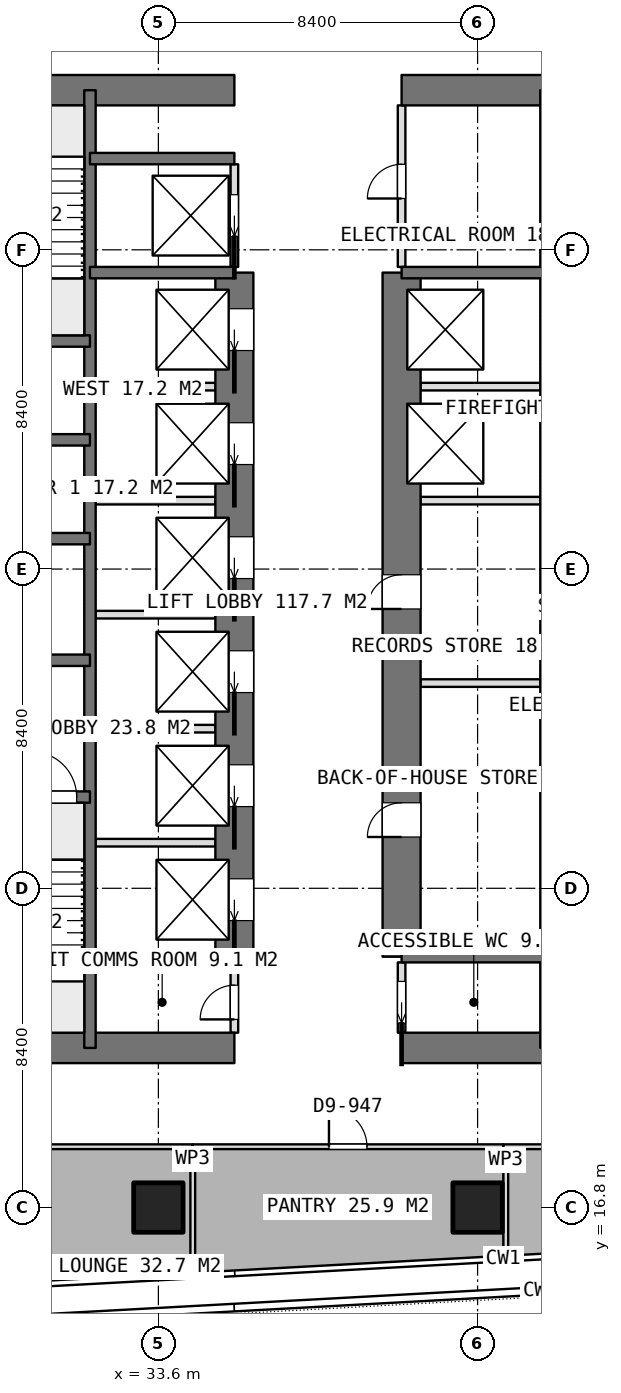
"""IFC4 building model, lengths in metres.
Left out: names, types, materials, properties, quantities, classifications, styles, units other than length and angle.
Written with IfcOpenShell. Run it as: python <this file> out.ifc"""

import sys

from ifc_helpers import new_model, si_unit, direction, frame, frame_2d, origin, origin_2d, place, context, subcontext, project, spatial, rectangle, extrude, element, fill, save


model = new_model("IFC4")
c1 = context("Model", 3, precision=1e-05, world=origin(), true_north=direction((0.0, 1.0)))
c2 = subcontext(c1, "Body", "Model", "MODEL_VIEW")
j1 = project(units=[si_unit("LENGTHUNIT", "METRE"), si_unit("PLANEANGLEUNIT", "RADIAN")], contexts=[c1])
p1 = place(None, origin())
s1 = spatial("IfcSite", under=j1, at=p1, CompositionType="ELEMENT")
p2 = place(p1, origin())
s2 = spatial("IfcBuilding", under=s1, at=p2, CompositionType="ELEMENT")
p3 = place(p2, frame((0.0, 0.0, 253.85)))
s3 = spatial("IfcBuildingStorey", under=s2, at=p3, CompositionType="ELEMENT", Elevation=253.85)
p4 = place(p3, frame((25.2, 21.0, 0.0), z_axis=(0.0, 0.0, 1.0), x_axis=(1.0, 0.0, 0.0)))
e1 = element("IfcWall", 1, at=p4, inside=s3, PredefinedType="SHEAR", context=c2, shape_type="SweptSolid", body=[
    extrude(rectangle(XDim=10.4, YDim=0.8, at=frame_2d((5.2, 0.0))), origin(), (0.0, 0.0, 1.0), 3.75),
])
p5 = place(p3, frame((40.0, 21.0, 0.0), z_axis=(0.0, 0.0, 1.0), x_axis=(1.0, 0.0, 0.0)))
e2 = element("IfcWall", 2, at=p5, inside=s3, PredefinedType="SHEAR", context=c2, shape_type="SweptSolid", body=[
    extrude(rectangle(XDim=10.4, YDim=0.8, at=frame_2d((5.2, 0.0))), origin(), (0.0, 0.0, 1.0), 3.75),
])
p6 = place(p3, frame((25.2, 46.2, 0.0), z_axis=(0.0, 0.0, 1.0), x_axis=(1.0, 0.0, 0.0)))
e3 = element("IfcWall", 3, at=p6, inside=s3, PredefinedType="SHEAR", context=c2, shape_type="SweptSolid", body=[
    extrude(rectangle(XDim=10.4, YDim=0.8, at=frame_2d((5.2, 0.0))), origin(), (0.0, 0.0, 1.0), 3.75),
])
p7 = place(p3, frame((40.0, 46.2, 0.0), z_axis=(0.0, 0.0, 1.0), x_axis=(1.0, 0.0, 0.0)))
e4 = element("IfcWall", 4, at=p7, inside=s3, PredefinedType="SHEAR", context=c2, shape_type="SweptSolid", body=[
    extrude(rectangle(XDim=10.4, YDim=0.8, at=frame_2d((5.2, 0.0))), origin(), (0.0, 0.0, 1.0), 3.75),
])
for number, where, z_axis, x_axis in (
    (5, (31.8, 21.0, 0.0), (0.0, 0.0, 1.0), (0.0, 1.0, 0.0)),
    (6, (43.8, 21.0, 0.0), (0.0, 0.0, 1.0), (0.0, 1.0, 0.0)),
):
    element("IfcWall", number, at=place(p3, frame(where, z_axis=z_axis, x_axis=x_axis)), inside=s3, PredefinedType="SHEAR", context=c2, shape_type="SweptSolid", body=[
        extrude(rectangle(XDim=25.2, YDim=0.3, at=frame_2d((12.6, 0.0))), origin(), (0.0, 0.0, 1.0), 3.75),
    ])
p8 = place(p3, frame((35.6, 23.4, 0.0), z_axis=(0.0, 0.0, 1.0), x_axis=(0.0, 1.0, 0.0)))
e7 = element("IfcWall", 7, at=p8, inside=s3, PredefinedType="SHEAR", context=c2, shape_type="SweptSolid", body=[
    extrude(rectangle(XDim=18.0, YDim=1.0, at=frame_2d((9.0, 0.0))), origin(), (0.0, 0.0, 1.0), 3.75),
])
p9 = place(p8, frame((0.95, 0.0, 0.0)))
e8 = element("IfcOpeningElement", 8, at=p9, cuts=e7, PredefinedType="OPENING", context=c2, shape_type="SweptSolid", body=[
    extrude(rectangle(XDim=1.1, YDim=2.1, at=frame_2d((0.55, 1.05))), frame((0.0, 0.51, 0.0), z_axis=(0.0, -1.0, 0.0), x_axis=(1.0, 0.0, 0.0)), (0.0, 0.0, 1.0), 1.02),
])
p10 = place(p8, frame((3.95, 0.0, 0.0)))
e9 = element("IfcOpeningElement", 9, at=p10, cuts=e7, PredefinedType="OPENING", context=c2, shape_type="SweptSolid", body=[
    extrude(rectangle(XDim=1.1, YDim=2.1, at=frame_2d((0.55, 1.05))), frame((0.0, 0.51, 0.0), z_axis=(0.0, -1.0, 0.0), x_axis=(1.0, 0.0, 0.0)), (0.0, 0.0, 1.0), 1.02),
])
p11 = place(p8, frame((6.95, 0.0, 0.0)))
e10 = element("IfcOpeningElement", 10, at=p11, cuts=e7, PredefinedType="OPENING", context=c2, shape_type="SweptSolid", body=[
    extrude(rectangle(XDim=1.1, YDim=2.1, at=frame_2d((0.55, 1.05))), frame((0.0, 0.51, 0.0), z_axis=(0.0, -1.0, 0.0), x_axis=(1.0, 0.0, 0.0)), (0.0, 0.0, 1.0), 1.02),
])
p12 = place(p8, frame((9.95, 0.0, 0.0)))
e11 = element("IfcOpeningElement", 11, at=p12, cuts=e7, PredefinedType="OPENING", context=c2, shape_type="SweptSolid", body=[
    extrude(rectangle(XDim=1.1, YDim=2.1, at=frame_2d((0.55, 1.05))), frame((0.0, 0.51, 0.0), z_axis=(0.0, -1.0, 0.0), x_axis=(1.0, 0.0, 0.0)), (0.0, 0.0, 1.0), 1.02),
])
p13 = place(p8, frame((12.95, 0.0, 0.0)))
e12 = element("IfcOpeningElement", 12, at=p13, cuts=e7, PredefinedType="OPENING", context=c2, shape_type="SweptSolid", body=[
    extrude(rectangle(XDim=1.1, YDim=2.1, at=frame_2d((0.55, 1.05))), frame((0.0, 0.51, 0.0), z_axis=(0.0, -1.0, 0.0), x_axis=(1.0, 0.0, 0.0)), (0.0, 0.0, 1.0), 1.02),
])
p14 = place(p8, frame((15.95, 0.0, 0.0)))
e13 = element("IfcOpeningElement", 13, at=p14, cuts=e7, PredefinedType="OPENING", context=c2, shape_type="SweptSolid", body=[
    extrude(rectangle(XDim=1.1, YDim=2.1, at=frame_2d((0.55, 1.05))), frame((0.0, 0.51, 0.0), z_axis=(0.0, -1.0, 0.0), x_axis=(1.0, 0.0, 0.0)), (0.0, 0.0, 1.0), 1.02),
])
p15 = place(p3, frame((40.0, 23.4, 0.0), z_axis=(0.0, 0.0, 1.0), x_axis=(0.0, 1.0, 0.0)))
e14 = element("IfcWall", 14, at=p15, inside=s3, PredefinedType="SHEAR", context=c2, shape_type="SweptSolid", body=[
    extrude(rectangle(XDim=18.0, YDim=1.0, at=frame_2d((9.0, 0.0))), origin(), (0.0, 0.0, 1.0), 3.75),
])
p16 = place(p15, frame((3.15, 0.0, 0.0)))
e15 = element("IfcOpeningElement", 15, at=p16, cuts=e14, PredefinedType="OPENING", context=c2, shape_type="SweptSolid", body=[
    extrude(rectangle(XDim=0.9, YDim=2.1, at=frame_2d((0.45, 1.05))), frame((0.0, 0.51, 0.0), z_axis=(0.0, -1.0, 0.0), x_axis=(1.0, 0.0, 0.0)), (0.0, 0.0, 1.0), 1.02),
])
p17 = place(p15, frame((9.15, 0.0, 0.0)))
e16 = element("IfcOpeningElement", 16, at=p17, cuts=e14, PredefinedType="OPENING", context=c2, shape_type="SweptSolid", body=[
    extrude(rectangle(XDim=0.9, YDim=2.1, at=frame_2d((0.45, 1.05))), frame((0.0, 0.51, 0.0), z_axis=(0.0, -1.0, 0.0), x_axis=(1.0, 0.0, 0.0)), (0.0, 0.0, 1.0), 1.02),
])
for number, where, z_axis, x_axis in (
    (17, (31.8, 23.4, 0.0), (0.0, 0.0, 1.0), (1.0, 0.0, 0.0)),
    (18, (31.8, 41.4, 0.0), (0.0, 0.0, 1.0), (1.0, 0.0, 0.0)),
    (19, (31.8, 44.4, 0.0), (0.0, 0.0, 1.0), (1.0, 0.0, 0.0)),
    (20, (40.0, 23.4, 0.0), (0.0, 0.0, 1.0), (1.0, 0.0, 0.0)),
    (21, (40.0, 41.4, 0.0), (0.0, 0.0, 1.0), (1.0, 0.0, 0.0)),
):
    element("IfcWall", number, at=place(p3, frame(where, z_axis=z_axis, x_axis=x_axis)), inside=s3, PredefinedType="SHEAR", context=c2, shape_type="SweptSolid", body=[
        extrude(rectangle(XDim=3.8, YDim=0.3, at=frame_2d((1.9, 0.0))), origin(), (0.0, 0.0, 1.0), 3.75),
    ])
p18 = place(p3, frame((25.2, 27.6, 0.0), z_axis=(0.0, 0.0, 1.0), x_axis=(1.0, 0.0, 0.0)))
e22 = element("IfcWall", 22, at=p18, inside=s3, PredefinedType="SHEAR", context=c2, shape_type="SweptSolid", body=[
    extrude(rectangle(XDim=6.6, YDim=0.3, at=frame_2d((3.3, 0.0))), origin(), (0.0, 0.0, 1.0), 3.75),
])
p19 = place(p18, frame((5.05, 0.0, 0.0)))
e23 = element("IfcOpeningElement", 23, at=p19, cuts=e22, PredefinedType="OPENING", context=c2, shape_type="SweptSolid", body=[
    extrude(rectangle(XDim=1.2, YDim=2.1, at=frame_2d((0.6, 1.05))), frame((0.0, 0.16, 0.0), z_axis=(0.0, -1.0, 0.0), x_axis=(1.0, 0.0, 0.0)), (0.0, 0.0, 1.0), 0.32),
])
p20 = place(p3, frame((25.2, 31.2, 0.0), z_axis=(0.0, 0.0, 1.0), x_axis=(1.0, 0.0, 0.0)))
e24 = element("IfcWall", 24, at=p20, inside=s3, PredefinedType="SHEAR", context=c2, shape_type="SweptSolid", body=[
    extrude(rectangle(XDim=6.6, YDim=0.3, at=frame_2d((3.3, 0.0))), origin(), (0.0, 0.0, 1.0), 3.75),
])
p21 = place(p20, frame((2.65, 0.0, 0.0)))
e25 = element("IfcOpeningElement", 25, at=p21, cuts=e24, PredefinedType="OPENING", context=c2, shape_type="SweptSolid", body=[
    extrude(rectangle(XDim=1.3, YDim=2.1, at=frame_2d((0.65, 1.05))), frame((0.0, 0.16, 0.0), z_axis=(0.0, -1.0, 0.0), x_axis=(1.0, 0.0, 0.0)), (0.0, 0.0, 1.0), 0.32),
])
for number, where, z_axis, x_axis in (
    (26, (25.2, 34.4, 0.0), (0.0, 0.0, 1.0), (1.0, 0.0, 0.0)),
    (27, (25.2, 37.0, 0.0), (0.0, 0.0, 1.0), (1.0, 0.0, 0.0)),
    (28, (25.2, 39.6, 0.0), (0.0, 0.0, 1.0), (1.0, 0.0, 0.0)),
):
    element("IfcWall", number, at=place(p3, frame(where, z_axis=z_axis, x_axis=x_axis)), inside=s3, PredefinedType="SHEAR", context=c2, shape_type="SweptSolid", body=[
        extrude(rectangle(XDim=6.6, YDim=0.3, at=frame_2d((3.3, 0.0))), origin(), (0.0, 0.0, 1.0), 3.75),
    ])
for number, where, z_axis, x_axis in (
    (29, (33.6, 16.8, 0.0), (0.0, 0.0, 1.0), (1.0, 0.0, 0.0)),
    (30, (42.0, 16.8, 0.0), (0.0, 0.0, 1.0), (1.0, 0.0, 0.0)),
):
    element("IfcColumn", number, at=place(p3, frame(where, z_axis=z_axis, x_axis=x_axis)), inside=s3, PredefinedType="COLUMN", context=c2, shape_type="SweptSolid", body=[
        extrude(rectangle(XDim=1.3, YDim=1.3, at=origin_2d()), origin(), (0.0, 0.0, 1.0), 3.75),
    ])
for number, where, z_axis, x_axis in (
    (31, (31.95, 26.4, 0.0), (0.0, 0.0, 1.0), (1.0, 0.0, 0.0)),
    (32, (31.95, 29.4, 0.0), (0.0, 0.0, 1.0), (1.0, 0.0, 0.0)),
    (33, (31.95, 32.4, 0.0), (0.0, 0.0, 1.0), (1.0, 0.0, 0.0)),
    (34, (31.95, 35.4, 0.0), (0.0, 0.0, 1.0), (1.0, 0.0, 0.0)),
    (35, (31.95, 38.4, 0.0), (0.0, 0.0, 1.0), (1.0, 0.0, 0.0)),
):
    element("IfcWall", number, at=place(p3, frame(where, z_axis=z_axis, x_axis=x_axis)), inside=s3, PredefinedType="PARTITIONING", context=c2, shape_type="SweptSolid", body=[
        extrude(rectangle(XDim=3.15, YDim=0.2, at=frame_2d((1.575, 0.0))), origin(), (0.0, 0.0, 1.0), 3.5),
    ])
for number, where, z_axis, x_axis in (
    (36, (40.5, 35.4, 0.0), (0.0, 0.0, 1.0), (1.0, 0.0, 0.0)),
    (37, (40.5, 38.4, 0.0), (0.0, 0.0, 1.0), (1.0, 0.0, 0.0)),
):
    element("IfcWall", number, at=place(p3, frame(where, z_axis=z_axis, x_axis=x_axis)), inside=s3, PredefinedType="PARTITIONING", context=c2, shape_type="SweptSolid", body=[
        extrude(rectangle(XDim=3.15, YDim=0.2, at=frame_2d((1.575, 0.0))), origin(), (0.0, 0.0, 1.0), 3.5),
    ])
p22 = place(p3, frame((40.0, 21.4, 0.0), z_axis=(0.0, 0.0, 1.0), x_axis=(0.0, 1.0, 0.0)))
e38 = element("IfcWall", 38, at=p22, inside=s3, PredefinedType="PARTITIONING", context=c2, shape_type="SweptSolid", body=[
    extrude(rectangle(XDim=1.85, YDim=0.2, at=frame_2d((0.925, 0.0))), origin(), (0.0, 0.0, 1.0), 3.5),
])
p23 = place(p22, frame((0.25, 0.0, 0.0)))
e39 = element("IfcOpeningElement", 39, at=p23, cuts=e38, PredefinedType="OPENING", context=c2, shape_type="SweptSolid", body=[
    extrude(rectangle(XDim=1.1, YDim=2.1, at=frame_2d((0.55, 1.05))), frame((0.0, 0.11, 0.0), z_axis=(0.0, -1.0, 0.0), x_axis=(1.0, 0.0, 0.0)), (0.0, 0.0, 1.0), 0.22),
])
p24 = place(p3, frame((40.0, 41.55, 0.0), z_axis=(0.0, 0.0, 1.0), x_axis=(0.0, 1.0, 0.0)))
e40 = element("IfcWall", 40, at=p24, inside=s3, PredefinedType="PARTITIONING", context=c2, shape_type="SweptSolid", body=[
    extrude(rectangle(XDim=4.25, YDim=0.2, at=frame_2d((2.125, 0.0))), origin(), (0.0, 0.0, 1.0), 3.5),
])
p25 = place(p24, frame((1.8, 0.0, 0.0)))
e41 = element("IfcOpeningElement", 41, at=p25, cuts=e40, PredefinedType="OPENING", context=c2, shape_type="SweptSolid", body=[
    extrude(rectangle(XDim=0.9, YDim=2.1, at=frame_2d((0.45, 1.05))), frame((0.0, 0.11, 0.0), z_axis=(0.0, -1.0, 0.0), x_axis=(1.0, 0.0, 0.0)), (0.0, 0.0, 1.0), 0.22),
])
p26 = place(p3, frame((35.6, 41.55, 0.0), z_axis=(0.0, 0.0, 1.0), x_axis=(0.0, 1.0, 0.0)))
e42 = element("IfcWall", 42, at=p26, inside=s3, PredefinedType="PARTITIONING", context=c2, shape_type="SweptSolid", body=[
    extrude(rectangle(XDim=2.7, YDim=0.2, at=frame_2d((1.35, 0.0))), origin(), (0.0, 0.0, 1.0), 3.5),
])
p27 = place(p26, frame((0.8, 0.0, 0.0)))
e43 = element("IfcOpeningElement", 43, at=p27, cuts=e42, PredefinedType="OPENING", context=c2, shape_type="SweptSolid", body=[
    extrude(rectangle(XDim=1.1, YDim=2.1, at=frame_2d((0.55, 1.05))), frame((0.0, 0.11, 0.0), z_axis=(0.0, -1.0, 0.0), x_axis=(1.0, 0.0, 0.0)), (0.0, 0.0, 1.0), 0.22),
])
p28 = place(p3, frame((35.6, 21.4, 0.0), z_axis=(0.0, 0.0, 1.0), x_axis=(0.0, 1.0, 0.0)))
e44 = element("IfcWall", 44, at=p28, inside=s3, PredefinedType="PARTITIONING", context=c2, shape_type="SweptSolid", body=[
    extrude(rectangle(XDim=1.85, YDim=0.2, at=frame_2d((0.925, 0.0))), origin(), (0.0, 0.0, 1.0), 3.5),
])
p29 = place(p28, frame((0.35, 0.0, 0.0)))
e45 = element("IfcOpeningElement", 45, at=p29, cuts=e44, PredefinedType="OPENING", context=c2, shape_type="SweptSolid", body=[
    extrude(rectangle(XDim=0.9, YDim=2.1, at=frame_2d((0.45, 1.05))), frame((0.0, 0.11, 0.0), z_axis=(0.0, -1.0, 0.0), x_axis=(1.0, 0.0, 0.0)), (0.0, 0.0, 1.0), 0.22),
])
p30 = place(p3, frame((40.5, 30.6, 0.0), z_axis=(0.0, 0.0, 1.0), x_axis=(1.0, 0.0, 0.0)))
e46 = element("IfcWall", 46, at=p30, inside=s3, PredefinedType="PARTITIONING", context=c2, shape_type="SweptSolid", body=[
    extrude(rectangle(XDim=3.15, YDim=0.2, at=frame_2d((1.575, 0.0))), origin(), (0.0, 0.0, 1.0), 3.5),
])
p31 = place(p3, frame((42.742, 15.538, 0.0), z_axis=(0.0, 0.0, 1.0), x_axis=(0.0, 1.0, 0.0)))
e47 = element("IfcWall", 47, at=p31, inside=s3, PredefinedType="PARTITIONING", context=c2, shape_type="SweptSolid", body=[
    extrude(rectangle(XDim=2.799, YDim=0.125, at=frame_2d((1.399, 0.0))), origin(), (0.0, 0.0, 1.0), 3.5),
])
p32 = place(p3, frame((42.674, 18.4, 0.0), z_axis=(0.0, 0.0, 1.0), x_axis=(1.0, 0.0, 0.0)))
e48 = element("IfcWall", 48, at=p32, inside=s3, PredefinedType="PARTITIONING", context=c2, shape_type="SweptSolid", body=[
    extrude(rectangle(XDim=12.015, YDim=0.125, at=frame_2d((6.007, 0.0))), origin(), (0.0, 0.0, 1.0), 3.5),
])
p33 = place(p32, frame((5.438, 0.0, 0.0)))
e49 = element("IfcOpeningElement", 49, at=p33, cuts=e48, PredefinedType="OPENING", context=c2, shape_type="SweptSolid", body=[
    extrude(rectangle(XDim=1.0, YDim=2.1, at=frame_2d((0.5, 1.05))), frame((0.0, 0.073, 0.0), z_axis=(0.0, -1.0, 0.0), x_axis=(1.0, 0.0, 0.0)), (0.0, 0.0, 1.0), 0.145),
])
p34 = place(p3, frame((34.505, 15.059, 0.0), z_axis=(0.0, 0.0, 1.0), x_axis=(0.0, 1.0, 0.0)))
e50 = element("IfcWall", 50, at=p34, inside=s3, PredefinedType="PARTITIONING", context=c2, shape_type="SweptSolid", body=[
    extrude(rectangle(XDim=3.341, YDim=0.125, at=frame_2d((1.67, 0.0))), origin(), (0.0, 0.0, 1.0), 3.5),
])
p35 = place(p3, frame((34.505, 18.4, 0.0), z_axis=(0.0, 0.0, 1.0), x_axis=(1.0, 0.0, 0.0)))
e51 = element("IfcWall", 51, at=p35, inside=s3, PredefinedType="PARTITIONING", context=c2, shape_type="SweptSolid", body=[
    extrude(rectangle(XDim=8.168, YDim=0.125, at=frame_2d((4.084, 0.0))), origin(), (0.0, 0.0, 1.0), 3.5),
])
p36 = place(p35, frame((3.584, 0.0, 0.0)))
e52 = element("IfcOpeningElement", 52, at=p36, cuts=e51, PredefinedType="OPENING", context=c2, shape_type="SweptSolid", body=[
    extrude(rectangle(XDim=1.0, YDim=2.1, at=frame_2d((0.5, 1.05))), frame((0.0, 0.073, 0.0), z_axis=(0.0, -1.0, 0.0), x_axis=(1.0, 0.0, 0.0)), (0.0, 0.0, 1.0), 0.145),
])
p37 = place(p3, frame((25.207, 18.4, 0.0), z_axis=(0.0, 0.0, 1.0), x_axis=(1.0, 0.0, 0.0)))
e53 = element("IfcWall", 53, at=p37, inside=s3, PredefinedType="PARTITIONING", context=c2, shape_type="SweptSolid", body=[
    extrude(rectangle(XDim=9.297, YDim=0.125, at=frame_2d((4.648, 0.0))), origin(), (0.0, 0.0, 1.0), 3.5),
])
p38 = place(p37, frame((4.148, 0.0, 0.0)))
e54 = element("IfcOpeningElement", 54, at=p38, cuts=e53, PredefinedType="OPENING", context=c2, shape_type="SweptSolid", body=[
    extrude(rectangle(XDim=1.0, YDim=2.1, at=frame_2d((0.5, 1.05))), frame((0.0, 0.073, 0.0), z_axis=(0.0, -1.0, 0.0), x_axis=(1.0, 0.0, 0.0)), (0.0, 0.0, 1.0), 0.145),
])
p39 = place(p23, origin())
e55 = element("IfcDoor", 55, at=p39, inside=s3, OperationType="SLIDING_TO_LEFT", PredefinedType="DOOR", context=c2, shape_type="SweptSolid", body=[
    extrude(rectangle(XDim=1.1, YDim=2.1, at=frame_2d((0.55, 1.05))), frame((0.0, 0.025, 0.0), z_axis=(0.0, -1.0, 0.0), x_axis=(1.0, 0.0, 0.0)), (0.0, 0.0, 1.0), 0.05),
])
fill(e39, e55)
p40 = place(p29, origin())
e56 = element("IfcDoor", 56, at=p40, inside=s3, OperationType="SINGLE_SWING_LEFT", PredefinedType="DOOR", context=c2, shape_type="SweptSolid", body=[
    extrude(rectangle(XDim=0.9, YDim=2.1, at=frame_2d((0.45, 1.05))), frame((0.0, 0.025, 0.0), z_axis=(0.0, -1.0, 0.0), x_axis=(1.0, 0.0, 0.0)), (0.0, 0.0, 1.0), 0.05),
])
fill(e45, e56)
p41 = place(p25, origin())
e57 = element("IfcDoor", 57, at=p41, inside=s3, OperationType="SINGLE_SWING_LEFT", PredefinedType="DOOR", context=c2, shape_type="SweptSolid", body=[
    extrude(rectangle(XDim=0.9, YDim=2.1, at=frame_2d((0.45, 1.05))), frame((0.0, 0.025, 0.0), z_axis=(0.0, -1.0, 0.0), x_axis=(1.0, 0.0, 0.0)), (0.0, 0.0, 1.0), 0.05),
])
fill(e41, e57)
p42 = place(p16, origin())
e58 = element("IfcDoor", 58, at=p42, inside=s3, OperationType="SINGLE_SWING_LEFT", PredefinedType="DOOR", context=c2, shape_type="SweptSolid", body=[
    extrude(rectangle(XDim=0.9, YDim=2.1, at=frame_2d((0.45, 1.05))), frame((0.0, 0.025, 0.0), z_axis=(0.0, -1.0, 0.0), x_axis=(1.0, 0.0, 0.0)), (0.0, 0.0, 1.0), 0.05),
])
fill(e15, e58)
p43 = place(p17, origin())
e59 = element("IfcDoor", 59, at=p43, inside=s3, OperationType="SINGLE_SWING_LEFT", PredefinedType="DOOR", context=c2, shape_type="SweptSolid", body=[
    extrude(rectangle(XDim=0.9, YDim=2.1, at=frame_2d((0.45, 1.05))), frame((0.0, 0.025, 0.0), z_axis=(0.0, -1.0, 0.0), x_axis=(1.0, 0.0, 0.0)), (0.0, 0.0, 1.0), 0.05),
])
fill(e16, e59)
p44 = place(p9, origin())
e60 = element("IfcDoor", 60, at=p44, inside=s3, OperationType="SLIDING_TO_LEFT", PredefinedType="USERDEFINED", context=c2, shape_type="SweptSolid", body=[
    extrude(rectangle(XDim=1.1, YDim=2.1, at=frame_2d((0.55, 1.05))), frame((0.0, 0.025, 0.0), z_axis=(0.0, -1.0, 0.0), x_axis=(1.0, 0.0, 0.0)), (0.0, 0.0, 1.0), 0.05),
])
fill(e8, e60)
p45 = place(p10, origin())
e61 = element("IfcDoor", 61, at=p45, inside=s3, OperationType="SLIDING_TO_LEFT", PredefinedType="USERDEFINED", context=c2, shape_type="SweptSolid", body=[
    extrude(rectangle(XDim=1.1, YDim=2.1, at=frame_2d((0.55, 1.05))), frame((0.0, 0.025, 0.0), z_axis=(0.0, -1.0, 0.0), x_axis=(1.0, 0.0, 0.0)), (0.0, 0.0, 1.0), 0.05),
])
fill(e9, e61)
p46 = place(p11, origin())
e62 = element("IfcDoor", 62, at=p46, inside=s3, OperationType="SLIDING_TO_LEFT", PredefinedType="USERDEFINED", context=c2, shape_type="SweptSolid", body=[
    extrude(rectangle(XDim=1.1, YDim=2.1, at=frame_2d((0.55, 1.05))), frame((0.0, 0.025, 0.0), z_axis=(0.0, -1.0, 0.0), x_axis=(1.0, 0.0, 0.0)), (0.0, 0.0, 1.0), 0.05),
])
fill(e10, e62)
p47 = place(p12, origin())
e63 = element("IfcDoor", 63, at=p47, inside=s3, OperationType="SLIDING_TO_LEFT", PredefinedType="USERDEFINED", context=c2, shape_type="SweptSolid", body=[
    extrude(rectangle(XDim=1.1, YDim=2.1, at=frame_2d((0.55, 1.05))), frame((0.0, 0.025, 0.0), z_axis=(0.0, -1.0, 0.0), x_axis=(1.0, 0.0, 0.0)), (0.0, 0.0, 1.0), 0.05),
])
fill(e11, e63)
p48 = place(p13, origin())
e64 = element("IfcDoor", 64, at=p48, inside=s3, OperationType="SLIDING_TO_LEFT", PredefinedType="USERDEFINED", context=c2, shape_type="SweptSolid", body=[
    extrude(rectangle(XDim=1.1, YDim=2.1, at=frame_2d((0.55, 1.05))), frame((0.0, 0.025, 0.0), z_axis=(0.0, -1.0, 0.0), x_axis=(1.0, 0.0, 0.0)), (0.0, 0.0, 1.0), 0.05),
])
fill(e12, e64)
p49 = place(p14, origin())
e65 = element("IfcDoor", 65, at=p49, inside=s3, OperationType="SLIDING_TO_LEFT", PredefinedType="USERDEFINED", context=c2, shape_type="SweptSolid", body=[
    extrude(rectangle(XDim=1.1, YDim=2.1, at=frame_2d((0.55, 1.05))), frame((0.0, 0.025, 0.0), z_axis=(0.0, -1.0, 0.0), x_axis=(1.0, 0.0, 0.0)), (0.0, 0.0, 1.0), 0.05),
])
fill(e13, e65)
p50 = place(p27, origin())
e66 = element("IfcDoor", 66, at=p50, inside=s3, OperationType="SLIDING_TO_LEFT", PredefinedType="USERDEFINED", context=c2, shape_type="SweptSolid", body=[
    extrude(rectangle(XDim=1.1, YDim=2.1, at=frame_2d((0.55, 1.05))), frame((0.0, 0.025, 0.0), z_axis=(0.0, -1.0, 0.0), x_axis=(1.0, 0.0, 0.0)), (0.0, 0.0, 1.0), 0.05),
])
fill(e43, e66)
p51 = place(p36, origin())
e67 = element("IfcDoor", 67, at=p51, inside=s3, OperationType="SINGLE_SWING_LEFT", PredefinedType="DOOR", context=c2, shape_type="SweptSolid", body=[
    extrude(rectangle(XDim=1.0, YDim=2.1, at=frame_2d((0.5, 1.05))), frame((0.0, 0.025, 0.0), z_axis=(0.0, -1.0, 0.0), x_axis=(1.0, 0.0, 0.0)), (0.0, 0.0, 1.0), 0.05),
])
fill(e52, e67)
p52 = place(p19, origin())
e68 = element("IfcDoor", 68, at=p52, inside=s3, OperationType="SINGLE_SWING_RIGHT", PredefinedType="DOOR", context=c2, shape_type="SweptSolid", body=[
    extrude(rectangle(XDim=1.2, YDim=2.1, at=frame_2d((0.6, 1.05))), frame((0.0, 0.025, 0.0), z_axis=(0.0, -1.0, 0.0), x_axis=(1.0, 0.0, 0.0)), (0.0, 0.0, 1.0), 0.05),
])
fill(e23, e68)
save(model, sys.argv[1])
